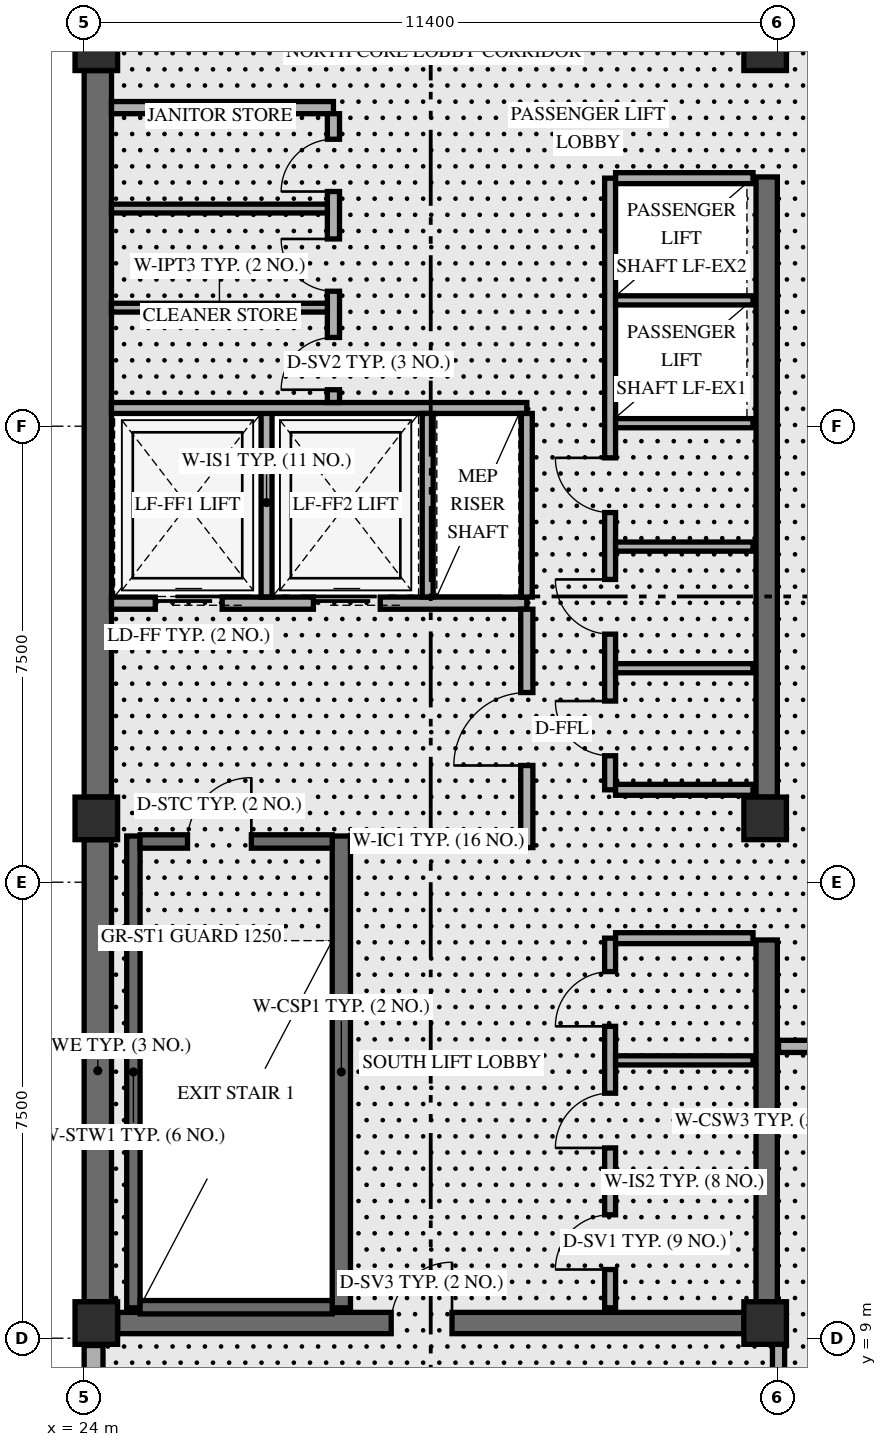
"""IFC4 building model, lengths in metres.
Left out: names, types, materials, properties, quantities, classifications, styles, units other than length and angle.
Written with IfcOpenShell. Run it as: python <this file> out.ifc"""

import sys

from ifc_helpers import new_model, si_unit, direction, frame, frame_2d, origin, origin_2d, place, context, subcontext, project, spatial, rectangle, extrude, element, fill, save


model = new_model("IFC4")
c1 = context("Model", 3, precision=1e-05, world=origin(), true_north=direction((0.0, 1.0)))
c2 = subcontext(c1, "Body", "Model", "MODEL_VIEW")
j1 = project(units=[si_unit("LENGTHUNIT", "METRE"), si_unit("PLANEANGLEUNIT", "RADIAN")], contexts=[c1])
p1 = place(None, origin())
s1 = spatial("IfcSite", under=j1, at=p1, CompositionType="ELEMENT")
p2 = place(p1, origin())
s2 = spatial("IfcBuilding", under=s1, at=p2, CompositionType="ELEMENT")
p3 = place(p2, frame((0.0, 0.0, 287.0)))
s3 = spatial("IfcBuildingStorey", under=s2, at=p3, CompositionType="ELEMENT", Elevation=287.0)
p4 = place(p3, frame((24.225, 9.6, 0.0), z_axis=(0.0, 0.0, 1.0), x_axis=(0.0, 1.0, 0.0)))
e1 = element("IfcWall", 1, at=p4, inside=s3, PredefinedType="SHEAR", context=c2, shape_type="SweptSolid", body=[
    extrude(rectangle(XDim=7.6, YDim=0.45, at=frame_2d((3.8, 0.0))), origin(), (0.0, 0.0, 1.0), 5.161),
])
p5 = place(p3, frame((24.225, 17.9, 0.0), z_axis=(0.0, 0.0, 1.0), x_axis=(0.0, 1.0, 0.0)))
e2 = element("IfcWall", 2, at=p5, inside=s3, PredefinedType="SHEAR", context=c2, shape_type="SweptSolid", body=[
    extrude(rectangle(XDim=11.95, YDim=0.45, at=frame_2d((5.975, 0.0))), origin(), (0.0, 0.0, 1.0), 5.161),
])
p6 = place(p3, frame((35.225, 9.6, 0.0), z_axis=(0.0, 0.0, 1.0), x_axis=(0.0, 1.0, 0.0)))
e3 = element("IfcWall", 3, at=p6, inside=s3, PredefinedType="SHEAR", context=c2, shape_type="SweptSolid", body=[
    extrude(rectangle(XDim=5.95, YDim=0.35, at=frame_2d((2.975, 0.0))), origin(), (0.0, 0.0, 1.0), 5.161),
])
p7 = place(p3, frame((35.225, 17.9, 0.0), z_axis=(0.0, 0.0, 1.0), x_axis=(0.0, 1.0, 0.0)))
e4 = element("IfcWall", 4, at=p7, inside=s3, PredefinedType="SHEAR", context=c2, shape_type="SweptSolid", body=[
    extrude(rectangle(XDim=10.2, YDim=0.35, at=frame_2d((5.1, 0.0))), origin(), (0.0, 0.0, 1.0), 5.161),
])
p8 = place(p3, frame((24.55, 9.25, 0.0), z_axis=(0.0, 0.0, 1.0), x_axis=(1.0, 0.0, 0.0)))
e5 = element("IfcWall", 5, at=p8, inside=s3, PredefinedType="SHEAR", context=c2, shape_type="SweptSolid", body=[
    extrude(rectangle(XDim=10.3, YDim=0.35, at=frame_2d((5.15, 0.0))), origin(), (0.0, 0.0, 1.0), 5.7),
])
p9 = place(p8, frame((4.5, 0.0, 0.0)))
e6 = element("IfcOpeningElement", 6, at=p9, cuts=e5, PredefinedType="OPENING", context=c2, shape_type="SweptSolid", body=[
    extrude(rectangle(XDim=1.0, YDim=2.15, at=frame_2d((0.5, 1.075))), frame((0.0, 0.185, 0.0), z_axis=(0.0, -1.0, 0.0), x_axis=(1.0, 0.0, 0.0)), (0.0, 0.0, 1.0), 0.37),
])
p10 = place(p3, frame((24.81, 9.5, 0.0), z_axis=(0.0, 0.0, 1.0), x_axis=(0.0, 1.0, 0.0)))
e7 = element("IfcWall", 7, at=p10, inside=s3, PredefinedType="SHEAR", context=c2, shape_type="SweptSolid", body=[
    extrude(rectangle(XDim=7.76, YDim=0.22, at=frame_2d((3.88, 0.0))), origin(), (0.0, 0.0, 1.0), 5.7),
])
p11 = place(p3, frame((28.23, 9.5, 0.0), z_axis=(0.0, 0.0, 1.0), x_axis=(0.0, 1.0, 0.0)))
e8 = element("IfcWall", 8, at=p11, inside=s3, PredefinedType="SHEAR", context=c2, shape_type="SweptSolid", body=[
    extrude(rectangle(XDim=7.76, YDim=0.3, at=frame_2d((3.88, 0.0))), origin(), (0.0, 0.0, 1.0), 5.7),
])
p12 = place(p3, frame((24.92, 9.51, 0.0), z_axis=(0.0, 0.0, 1.0), x_axis=(1.0, 0.0, 0.0)))
e9 = element("IfcWall", 9, at=p12, inside=s3, PredefinedType="SHEAR", context=c2, shape_type="SweptSolid", body=[
    extrude(rectangle(XDim=3.16, YDim=0.22, at=frame_2d((1.58, 0.0))), origin(), (0.0, 0.0, 1.0), 5.7),
])
p13 = place(p3, frame((24.92, 17.17, 0.0), z_axis=(0.0, 0.0, 1.0), x_axis=(1.0, 0.0, 0.0)))
e10 = element("IfcWall", 10, at=p13, inside=s3, PredefinedType="SHEAR", context=c2, shape_type="SweptSolid", body=[
    extrude(rectangle(XDim=3.16, YDim=0.22, at=frame_2d((1.58, 0.0))), origin(), (0.0, 0.0, 1.0), 5.7),
])
p14 = place(p13, frame((0.78, 0.0, 0.0)))
e11 = element("IfcOpeningElement", 11, at=p14, cuts=e10, PredefinedType="OPENING", context=c2, shape_type="SweptSolid", body=[
    extrude(rectangle(XDim=1.05, YDim=2.15, at=frame_2d((0.525, 1.075))), frame((0.0, 0.12, 0.0), z_axis=(0.0, -1.0, 0.0), x_axis=(1.0, 0.0, 0.0)), (0.0, 0.0, 1.0), 0.24),
])
for number, where, z_axis, x_axis in (
    (12, (24.2, 9.25, 0.0), (0.0, 0.0, 1.0), (1.0, 0.0, 0.0)),
    (13, (24.2, 17.55, 0.0), (0.0, 0.0, 1.0), (1.0, 0.0, 0.0)),
    (14, (24.2, 30.2, 0.0), (0.0, 0.0, 1.0), (1.0, 0.0, 0.0)),
    (15, (35.2, 9.25, 0.0), (0.0, 0.0, 1.0), (1.0, 0.0, 0.0)),
    (16, (35.2, 17.55, 0.0), (0.0, 0.0, 1.0), (1.0, 0.0, 0.0)),
    (17, (35.2, 30.2, 0.0), (0.0, 0.0, 1.0), (1.0, 0.0, 0.0)),
):
    element("IfcColumn", number, at=place(p3, frame(where, z_axis=z_axis, x_axis=x_axis)), inside=s3, PredefinedType="COLUMN", context=c2, shape_type="SweptSolid", body=[
        extrude(rectangle(XDim=0.7, YDim=0.7, at=origin_2d()), origin(), (0.0, 0.0, 1.0), 5.996),
    ])
p15 = place(p3, frame((24.155, 7.32, 0.0), z_axis=(0.0, 0.0, 1.0), x_axis=(0.0, 1.0, 0.0)))
e18 = element("IfcWall", 18, at=p15, inside=s3, PredefinedType="SOLIDWALL", context=c2, shape_type="SweptSolid", body=[
    extrude(rectangle(XDim=1.56, YDim=0.31, at=frame_2d((0.78, 0.0))), origin(), (0.0, 0.0, 1.0), 5.143),
])
p16 = place(p3, frame((24.45, 21.09, 0.0), z_axis=(0.0, 0.0, 1.0), x_axis=(1.0, 0.0, 0.0)))
e19 = element("IfcWall", 19, at=p16, inside=s3, PredefinedType="STANDARD", context=c2, shape_type="SweptSolid", body=[
    extrude(rectangle(XDim=6.83, YDim=0.2, at=frame_2d((3.415, 0.0))), origin(), (0.0, 0.0, 1.0), 5.7),
])
p17 = place(p16, frame((0.72, 0.0, 0.0)))
e20 = element("IfcOpeningElement", 20, at=p17, cuts=e19, PredefinedType="OPENING", context=c2, shape_type="SweptSolid", body=[
    extrude(rectangle(XDim=1.1, YDim=2.2, at=frame_2d((0.55, 1.1))), frame((0.0, 0.11, 0.0), z_axis=(0.0, -1.0, 0.0), x_axis=(1.0, 0.0, 0.0)), (0.0, 0.0, 1.0), 0.22),
])
p18 = place(p16, frame((3.32, 0.0, 0.0)))
e21 = element("IfcOpeningElement", 21, at=p18, cuts=e19, PredefinedType="OPENING", context=c2, shape_type="SweptSolid", body=[
    extrude(rectangle(XDim=1.1, YDim=2.2, at=frame_2d((0.55, 1.1))), frame((0.0, 0.11, 0.0), z_axis=(0.0, -1.0, 0.0), x_axis=(1.0, 0.0, 0.0)), (0.0, 0.0, 1.0), 0.22),
])
p19 = place(p3, frame((28.38, 17.17, 0.0), z_axis=(0.0, 0.0, 1.0), x_axis=(1.0, 0.0, 0.0)))
e22 = element("IfcWall", 22, at=p19, inside=s3, PredefinedType="STANDARD", context=c2, shape_type="SweptSolid", body=[
    extrude(rectangle(XDim=2.9, YDim=0.2, at=frame_2d((1.45, 0.0))), origin(), (0.0, 0.0, 1.0), 5.7),
])
p20 = place(p3, frame((31.28, 17.07, 0.0), z_axis=(0.0, 0.0, 1.0), x_axis=(0.0, 1.0, 0.0)))
e23 = element("IfcWall", 23, at=p20, inside=s3, PredefinedType="STANDARD", context=c2, shape_type="SweptSolid", body=[
    extrude(rectangle(XDim=3.92, YDim=0.2, at=frame_2d((1.96, 0.0))), origin(), (0.0, 0.0, 1.0), 5.143),
])
p21 = place(p20, frame((1.35, 0.0, 0.0)))
e24 = element("IfcOpeningElement", 24, at=p21, cuts=e23, PredefinedType="OPENING", context=c2, shape_type="SweptSolid", body=[
    extrude(rectangle(XDim=1.2, YDim=2.15, at=frame_2d((0.6, 1.075))), frame((0.0, 0.11, 0.0), z_axis=(0.0, -1.0, 0.0), x_axis=(1.0, 0.0, 0.0)), (0.0, 0.0, 1.0), 0.22),
])
p22 = place(p3, frame((27.0, 21.19, 0.0), z_axis=(0.0, 0.0, 1.0), x_axis=(0.0, 1.0, 0.0)))
e25 = element("IfcWall", 25, at=p22, inside=s3, PredefinedType="STANDARD", context=c2, shape_type="SweptSolid", body=[
    extrude(rectangle(XDim=3.11, YDim=0.18, at=frame_2d((1.555, 0.0))), origin(), (0.0, 0.0, 1.0), 5.7),
])
p23 = place(p3, frame((24.45, 24.3, 0.0), z_axis=(0.0, 0.0, 1.0), x_axis=(1.0, 0.0, 0.0)))
e26 = element("IfcWall", 26, at=p23, inside=s3, PredefinedType="STANDARD", context=c2, shape_type="SweptSolid", body=[
    extrude(rectangle(XDim=6.83, YDim=0.18, at=frame_2d((3.415, 0.0))), origin(), (0.0, 0.0, 1.0), 5.7),
])
for number, where, z_axis, x_axis in (
    (27, (29.65, 21.19, 0.0), (0.0, 0.0, 1.0), (0.0, 1.0, 0.0)),
    (28, (31.28, 21.19, 0.0), (0.0, 0.0, 1.0), (0.0, 1.0, 0.0)),
):
    element("IfcWall", number, at=place(p3, frame(where, z_axis=z_axis, x_axis=x_axis)), inside=s3, PredefinedType="STANDARD", context=c2, shape_type="SweptSolid", body=[
        extrude(rectangle(XDim=3.02, YDim=0.18, at=frame_2d((1.51, 0.0))), origin(), (0.0, 0.0, 1.0), 5.7),
    ])
p24 = place(p3, frame((24.45, 29.24, 0.0), z_axis=(0.0, 0.0, 1.0), x_axis=(1.0, 0.0, 0.0)))
e29 = element("IfcWall", 29, at=p24, inside=s3, PredefinedType="STANDARD", context=c2, shape_type="SweptSolid", body=[
    extrude(rectangle(XDim=3.65, YDim=0.2, at=frame_2d((1.825, 0.0))), origin(), (0.0, 0.0, 1.0), 5.7),
])
p25 = place(p3, frame((28.1, 24.39, 0.0), z_axis=(0.0, 0.0, 1.0), x_axis=(0.0, 1.0, 0.0)))
e30 = element("IfcWall", 30, at=p25, inside=s3, PredefinedType="STANDARD", context=c2, shape_type="SweptSolid", body=[
    extrude(rectangle(XDim=4.75, YDim=0.2, at=frame_2d((2.375, 0.0))), origin(), (0.0, 0.0, 1.0), 5.7),
])
p26 = place(p25, frame((0.21, 0.0, 0.0)))
e31 = element("IfcOpeningElement", 31, at=p26, cuts=e30, PredefinedType="OPENING", context=c2, shape_type="SweptSolid", body=[
    extrude(rectangle(XDim=0.86, YDim=2.1, at=frame_2d((0.43, 1.05))), frame((0.0, 0.11, 0.0), z_axis=(0.0, -1.0, 0.0), x_axis=(1.0, 0.0, 0.0)), (0.0, 0.0, 1.0), 0.22),
])
p27 = place(p25, frame((1.83, 0.0, 0.0)))
e32 = element("IfcOpeningElement", 32, at=p27, cuts=e30, PredefinedType="OPENING", context=c2, shape_type="SweptSolid", body=[
    extrude(rectangle(XDim=0.86, YDim=2.1, at=frame_2d((0.43, 1.05))), frame((0.0, 0.11, 0.0), z_axis=(0.0, -1.0, 0.0), x_axis=(1.0, 0.0, 0.0)), (0.0, 0.0, 1.0), 0.22),
])
p28 = place(p25, frame((3.47, 0.0, 0.0)))
e33 = element("IfcOpeningElement", 33, at=p28, cuts=e30, PredefinedType="OPENING", context=c2, shape_type="SweptSolid", body=[
    extrude(rectangle(XDim=0.86, YDim=2.1, at=frame_2d((0.43, 1.05))), frame((0.0, 0.11, 0.0), z_axis=(0.0, -1.0, 0.0), x_axis=(1.0, 0.0, 0.0)), (0.0, 0.0, 1.0), 0.22),
])
for number, where, z_axis, x_axis in (
    (34, (24.45, 25.95, 0.0), (0.0, 0.0, 1.0), (1.0, 0.0, 0.0)),
    (35, (24.45, 27.58, 0.0), (0.0, 0.0, 1.0), (1.0, 0.0, 0.0)),
):
    element("IfcWall", number, at=place(p3, frame(where, z_axis=z_axis, x_axis=x_axis)), inside=s3, PredefinedType="PARTITIONING", context=c2, shape_type="SweptSolid", body=[
        extrude(rectangle(XDim=3.55, YDim=0.145, at=frame_2d((1.775, 0.0))), origin(), (0.0, 0.0, 1.0), 5.7),
    ])
p29 = place(p3, frame((32.65, 9.5, 0.0), z_axis=(0.0, 0.0, 1.0), x_axis=(0.0, 1.0, 0.0)))
e36 = element("IfcWall", 36, at=p29, inside=s3, PredefinedType="STANDARD", context=c2, shape_type="SweptSolid", body=[
    extrude(rectangle(XDim=6.08, YDim=0.18, at=frame_2d((3.04, 0.0))), origin(), (0.0, 0.0, 1.0), 5.7),
])
p30 = place(p29, frame((0.63, 0.0, 0.0)))
e37 = element("IfcOpeningElement", 37, at=p30, cuts=e36, PredefinedType="OPENING", context=c2, shape_type="SweptSolid", body=[
    extrude(rectangle(XDim=0.9, YDim=2.1, at=frame_2d((0.45, 1.05))), frame((0.0, 0.1, 0.0), z_axis=(0.0, -1.0, 0.0), x_axis=(1.0, 0.0, 0.0)), (0.0, 0.0, 1.0), 0.2),
])
p31 = place(p29, frame((2.63, 0.0, 0.0)))
e38 = element("IfcOpeningElement", 38, at=p31, cuts=e36, PredefinedType="OPENING", context=c2, shape_type="SweptSolid", body=[
    extrude(rectangle(XDim=0.9, YDim=2.1, at=frame_2d((0.45, 1.05))), frame((0.0, 0.1, 0.0), z_axis=(0.0, -1.0, 0.0), x_axis=(1.0, 0.0, 0.0)), (0.0, 0.0, 1.0), 0.2),
])
p32 = place(p29, frame((4.63, 0.0, 0.0)))
e39 = element("IfcOpeningElement", 39, at=p32, cuts=e36, PredefinedType="OPENING", context=c2, shape_type="SweptSolid", body=[
    extrude(rectangle(XDim=0.9, YDim=2.1, at=frame_2d((0.45, 1.05))), frame((0.0, 0.1, 0.0), z_axis=(0.0, -1.0, 0.0), x_axis=(1.0, 0.0, 0.0)), (0.0, 0.0, 1.0), 0.2),
])
p33 = place(p3, frame((32.74, 15.58, 0.0), z_axis=(0.0, 0.0, 1.0), x_axis=(1.0, 0.0, 0.0)))
e40 = element("IfcWall", 40, at=p33, inside=s3, PredefinedType="STANDARD", context=c2, shape_type="SweptSolid", body=[
    extrude(rectangle(XDim=2.26, YDim=0.18, at=frame_2d((1.13, 0.0))), origin(), (0.0, 0.0, 1.0), 5.7),
])
for number, where, z_axis, x_axis in (
    (41, (32.74, 11.57, 0.0), (0.0, 0.0, 1.0), (1.0, 0.0, 0.0)),
    (42, (32.74, 13.57, 0.0), (0.0, 0.0, 1.0), (1.0, 0.0, 0.0)),
):
    element("IfcWall", number, at=place(p3, frame(where, z_axis=z_axis, x_axis=x_axis)), inside=s3, PredefinedType="STANDARD", context=c2, shape_type="SweptSolid", body=[
        extrude(rectangle(XDim=2.26, YDim=0.15, at=frame_2d((1.13, 0.0))), origin(), (0.0, 0.0, 1.0), 5.7),
    ])
p34 = place(p3, frame((32.65, 18.02, 0.0), z_axis=(0.0, 0.0, 1.0), x_axis=(0.0, 1.0, 0.0)))
e43 = element("IfcWall", 43, at=p34, inside=s3, PredefinedType="STANDARD", context=c2, shape_type="SweptSolid", body=[
    extrude(rectangle(XDim=10.06, YDim=0.18, at=frame_2d((5.03, 0.0))), origin(), (0.0, 0.0, 1.0), 5.7),
])
p35 = place(p34, frame((0.56, 0.0, 0.0)))
e44 = element("IfcOpeningElement", 44, at=p35, cuts=e43, PredefinedType="OPENING", context=c2, shape_type="SweptSolid", body=[
    extrude(rectangle(XDim=0.9, YDim=2.1, at=frame_2d((0.45, 1.05))), frame((0.0, 0.1, 0.0), z_axis=(0.0, -1.0, 0.0), x_axis=(1.0, 0.0, 0.0)), (0.0, 0.0, 1.0), 0.2),
])
p36 = place(p34, frame((2.56, 0.0, 0.0)))
e45 = element("IfcOpeningElement", 45, at=p36, cuts=e43, PredefinedType="OPENING", context=c2, shape_type="SweptSolid", body=[
    extrude(rectangle(XDim=0.9, YDim=2.1, at=frame_2d((0.45, 1.05))), frame((0.0, 0.1, 0.0), z_axis=(0.0, -1.0, 0.0), x_axis=(1.0, 0.0, 0.0)), (0.0, 0.0, 1.0), 0.2),
])
p37 = place(p34, frame((4.56, 0.0, 0.0)))
e46 = element("IfcOpeningElement", 46, at=p37, cuts=e43, PredefinedType="OPENING", context=c2, shape_type="SweptSolid", body=[
    extrude(rectangle(XDim=0.9, YDim=2.1, at=frame_2d((0.45, 1.05))), frame((0.0, 0.1, 0.0), z_axis=(0.0, -1.0, 0.0), x_axis=(1.0, 0.0, 0.0)), (0.0, 0.0, 1.0), 0.2),
])
for number, where, z_axis, x_axis in (
    (47, (32.74, 18.02, 0.0), (0.0, 0.0, 1.0), (1.0, 0.0, 0.0)),
    (48, (32.74, 28.08, 0.0), (0.0, 0.0, 1.0), (1.0, 0.0, 0.0)),
):
    element("IfcWall", number, at=place(p3, frame(where, z_axis=z_axis, x_axis=x_axis)), inside=s3, PredefinedType="STANDARD", context=c2, shape_type="SweptSolid", body=[
        extrude(rectangle(XDim=2.26, YDim=0.18, at=frame_2d((1.13, 0.0))), origin(), (0.0, 0.0, 1.0), 5.7),
    ])
for number, where, z_axis, x_axis in (
    (49, (32.74, 20.02, 0.0), (0.0, 0.0, 1.0), (1.0, 0.0, 0.0)),
    (50, (32.74, 22.02, 0.0), (0.0, 0.0, 1.0), (1.0, 0.0, 0.0)),
    (51, (32.74, 24.05, 0.0), (0.0, 0.0, 1.0), (1.0, 0.0, 0.0)),
    (52, (32.74, 26.07, 0.0), (0.0, 0.0, 1.0), (1.0, 0.0, 0.0)),
):
    element("IfcWall", number, at=place(p3, frame(where, z_axis=z_axis, x_axis=x_axis)), inside=s3, PredefinedType="STANDARD", context=c2, shape_type="SweptSolid", body=[
        extrude(rectangle(XDim=2.26, YDim=0.15, at=frame_2d((1.13, 0.0))), origin(), (0.0, 0.0, 1.0), 5.7),
    ])
p38 = place(p3, frame((35.42, 13.8, 0.0), z_axis=(0.0, 0.0, 1.0), x_axis=(1.0, 0.0, 0.0)))
e53 = element("IfcWall", 53, at=p38, inside=s3, PredefinedType="STANDARD", context=c2, shape_type="SweptSolid", body=[
    extrude(rectangle(XDim=1.93, YDim=0.2, at=frame_2d((0.965, 0.0))), origin(), (0.0, 0.0, 1.0), 5.379),
])
p39 = place(p3, frame((35.42, 5.81, 0.0), z_axis=(0.0, 0.0, 1.0), x_axis=(0.0, 1.0, 0.0)))
e54 = element("IfcWall", 54, at=p39, inside=s3, PredefinedType="STANDARD", context=c2, shape_type="SweptSolid", body=[
    extrude(rectangle(XDim=3.44, YDim=0.2, at=frame_2d((1.72, 0.0))), origin(), (0.0, 0.0, 1.0), 5.143),
])
p40 = place(p14, frame((1.05, 0.0, 0.0), z_axis=(0.0, 0.0, 1.0), x_axis=(-1.0, 0.0, 0.0)))
e55 = element("IfcDoor", 55, at=p40, inside=s3, OperationType="SINGLE_SWING_LEFT", PredefinedType="DOOR", context=c2, shape_type="SweptSolid", body=[
    extrude(rectangle(XDim=1.05, YDim=2.15, at=frame_2d((0.525, 1.075))), frame((0.0, 0.025, 0.0), z_axis=(0.0, -1.0, 0.0), x_axis=(1.0, 0.0, 0.0)), (0.0, 0.0, 1.0), 0.05),
])
fill(e11, e55)
p41 = place(p17, origin())
e56 = element("IfcDoor", 56, at=p41, inside=s3, OperationType="SLIDING_TO_LEFT", PredefinedType="DOOR", context=c2, shape_type="SweptSolid", body=[
    extrude(rectangle(XDim=1.1, YDim=2.2, at=frame_2d((0.55, 1.1))), frame((0.0, 0.025, 0.0), z_axis=(0.0, -1.0, 0.0), x_axis=(1.0, 0.0, 0.0)), (0.0, 0.0, 1.0), 0.05),
])
fill(e20, e56)
p42 = place(p18, origin())
e57 = element("IfcDoor", 57, at=p42, inside=s3, OperationType="SLIDING_TO_LEFT", PredefinedType="DOOR", context=c2, shape_type="SweptSolid", body=[
    extrude(rectangle(XDim=1.1, YDim=2.2, at=frame_2d((0.55, 1.1))), frame((0.0, 0.025, 0.0), z_axis=(0.0, -1.0, 0.0), x_axis=(1.0, 0.0, 0.0)), (0.0, 0.0, 1.0), 0.05),
])
fill(e21, e57)
p43 = place(p21, origin())
e58 = element("IfcDoor", 58, at=p43, inside=s3, OperationType="SINGLE_SWING_LEFT", PredefinedType="DOOR", context=c2, shape_type="SweptSolid", body=[
    extrude(rectangle(XDim=1.2, YDim=2.15, at=frame_2d((0.6, 1.075))), frame((0.0, 0.025, 0.0), z_axis=(0.0, -1.0, 0.0), x_axis=(1.0, 0.0, 0.0)), (0.0, 0.0, 1.0), 0.05),
])
fill(e24, e58)
p44 = place(p26, origin())
e59 = element("IfcDoor", 59, at=p44, inside=s3, OperationType="SINGLE_SWING_LEFT", PredefinedType="DOOR", context=c2, shape_type="SweptSolid", body=[
    extrude(rectangle(XDim=0.86, YDim=2.1, at=frame_2d((0.43, 1.05))), frame((0.0, 0.025, 0.0), z_axis=(0.0, -1.0, 0.0), x_axis=(1.0, 0.0, 0.0)), (0.0, 0.0, 1.0), 0.05),
])
fill(e31, e59)
p45 = place(p27, origin())
e60 = element("IfcDoor", 60, at=p45, inside=s3, OperationType="SINGLE_SWING_RIGHT", PredefinedType="DOOR", context=c2, shape_type="SweptSolid", body=[
    extrude(rectangle(XDim=0.86, YDim=2.1, at=frame_2d((0.43, 1.05))), frame((0.0, 0.025, 0.0), z_axis=(0.0, -1.0, 0.0), x_axis=(1.0, 0.0, 0.0)), (0.0, 0.0, 1.0), 0.05),
])
fill(e32, e60)
p46 = place(p28, origin())
e61 = element("IfcDoor", 61, at=p46, inside=s3, OperationType="SINGLE_SWING_LEFT", PredefinedType="DOOR", context=c2, shape_type="SweptSolid", body=[
    extrude(rectangle(XDim=0.86, YDim=2.1, at=frame_2d((0.43, 1.05))), frame((0.0, 0.025, 0.0), z_axis=(0.0, -1.0, 0.0), x_axis=(1.0, 0.0, 0.0)), (0.0, 0.0, 1.0), 0.05),
])
fill(e33, e61)
p47 = place(p30, origin())
e62 = element("IfcDoor", 62, at=p47, inside=s3, OperationType="SINGLE_SWING_LEFT", PredefinedType="DOOR", context=c2, shape_type="SweptSolid", body=[
    extrude(rectangle(XDim=0.9, YDim=2.1, at=frame_2d((0.45, 1.05))), frame((0.0, 0.025, 0.0), z_axis=(0.0, -1.0, 0.0), x_axis=(1.0, 0.0, 0.0)), (0.0, 0.0, 1.0), 0.05),
])
fill(e37, e62)
p48 = place(p31, origin())
e63 = element("IfcDoor", 63, at=p48, inside=s3, OperationType="SINGLE_SWING_LEFT", PredefinedType="DOOR", context=c2, shape_type="SweptSolid", body=[
    extrude(rectangle(XDim=0.9, YDim=2.1, at=frame_2d((0.45, 1.05))), frame((0.0, 0.025, 0.0), z_axis=(0.0, -1.0, 0.0), x_axis=(1.0, 0.0, 0.0)), (0.0, 0.0, 1.0), 0.05),
])
fill(e38, e63)
p49 = place(p32, origin())
e64 = element("IfcDoor", 64, at=p49, inside=s3, OperationType="SINGLE_SWING_LEFT", PredefinedType="DOOR", context=c2, shape_type="SweptSolid", body=[
    extrude(rectangle(XDim=0.9, YDim=2.1, at=frame_2d((0.45, 1.05))), frame((0.0, 0.025, 0.0), z_axis=(0.0, -1.0, 0.0), x_axis=(1.0, 0.0, 0.0)), (0.0, 0.0, 1.0), 0.05),
])
fill(e39, e64)
p50 = place(p35, origin())
e65 = element("IfcDoor", 65, at=p50, inside=s3, OperationType="SINGLE_SWING_RIGHT", PredefinedType="DOOR", context=c2, shape_type="SweptSolid", body=[
    extrude(rectangle(XDim=0.9, YDim=2.1, at=frame_2d((0.45, 1.05))), frame((0.0, 0.025, 0.0), z_axis=(0.0, -1.0, 0.0), x_axis=(1.0, 0.0, 0.0)), (0.0, 0.0, 1.0), 0.05),
])
fill(e44, e65)
p51 = place(p36, origin())
e66 = element("IfcDoor", 66, at=p51, inside=s3, OperationType="SINGLE_SWING_RIGHT", PredefinedType="DOOR", context=c2, shape_type="SweptSolid", body=[
    extrude(rectangle(XDim=0.9, YDim=2.1, at=frame_2d((0.45, 1.05))), frame((0.0, 0.025, 0.0), z_axis=(0.0, -1.0, 0.0), x_axis=(1.0, 0.0, 0.0)), (0.0, 0.0, 1.0), 0.05),
])
fill(e45, e66)
p52 = place(p37, origin())
e67 = element("IfcDoor", 67, at=p52, inside=s3, OperationType="SINGLE_SWING_RIGHT", PredefinedType="DOOR", context=c2, shape_type="SweptSolid", body=[
    extrude(rectangle(XDim=0.9, YDim=2.1, at=frame_2d((0.45, 1.05))), frame((0.0, 0.025, 0.0), z_axis=(0.0, -1.0, 0.0), x_axis=(1.0, 0.0, 0.0)), (0.0, 0.0, 1.0), 0.05),
])
fill(e46, e67)
p53 = place(p9, frame((1.0, 0.0, 0.0), z_axis=(0.0, 0.0, 1.0), x_axis=(-1.0, 0.0, 0.0)))
e68 = element("IfcDoor", 68, at=p53, inside=s3, OperationType="SINGLE_SWING_LEFT", PredefinedType="DOOR", context=c2, shape_type="SweptSolid", body=[
    extrude(rectangle(XDim=1.0, YDim=2.15, at=frame_2d((0.5, 1.075))), frame((0.0, 0.025, 0.0), z_axis=(0.0, -1.0, 0.0), x_axis=(1.0, 0.0, 0.0)), (0.0, 0.0, 1.0), 0.05),
])
fill(e6, e68)
save(model, sys.argv[1])
